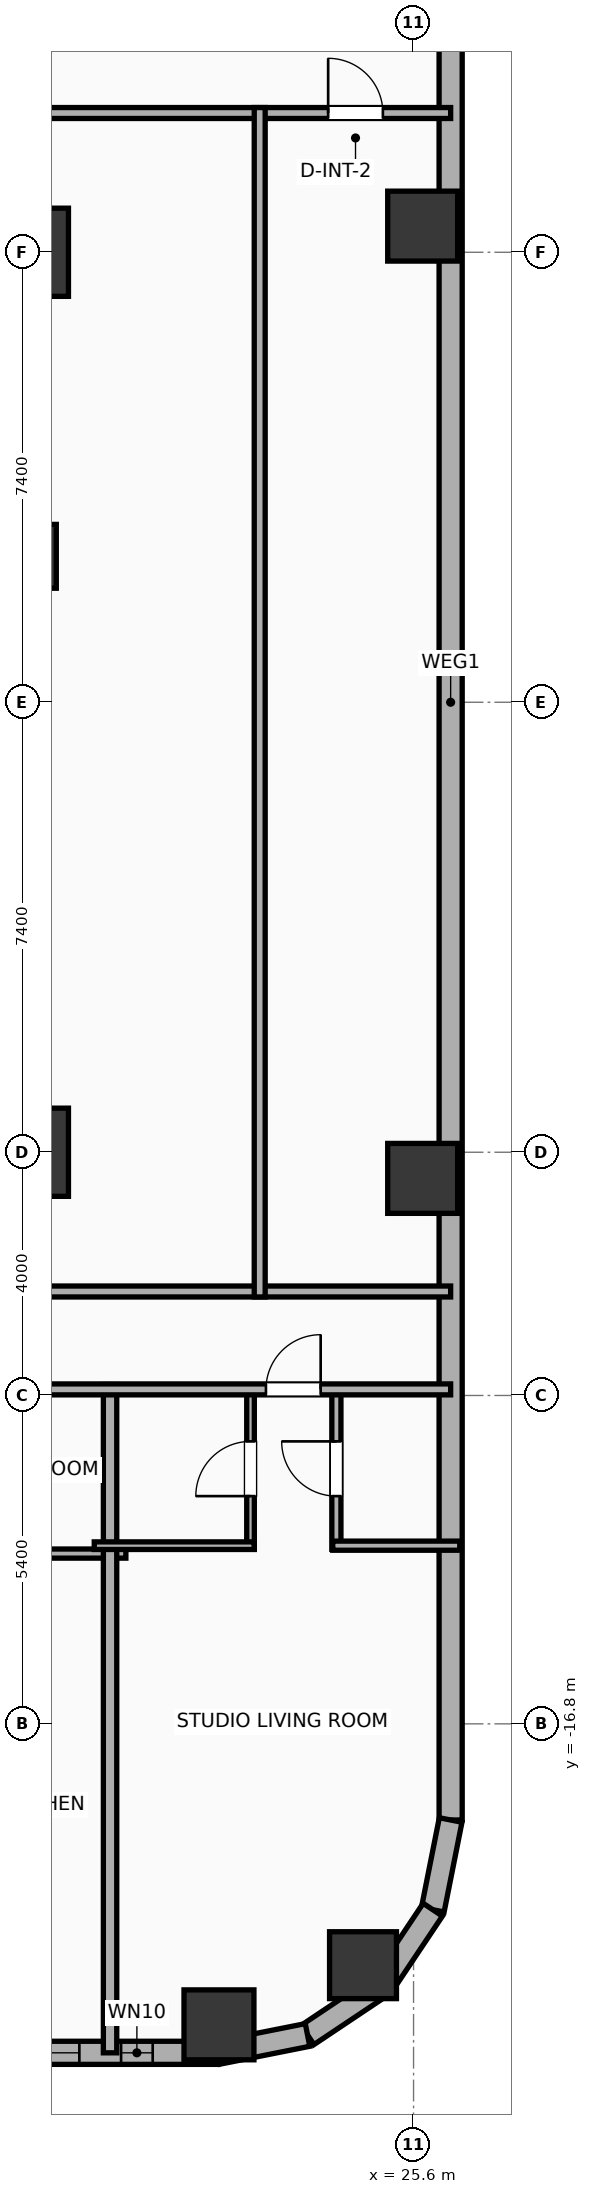
"""IFC4 building model, lengths in metres.
Left out: names, types, materials, properties, quantities, classifications, styles, units other than length and angle.
Written with IfcOpenShell. Run it as: python <this file> out.ifc"""

import sys

from ifc_helpers import new_model, si_unit, direction, frame, frame_2d, origin, origin_2d, place, context, subcontext, project, spatial, rectangle, hollow_rectangle, hollow_circle, extrude, element, fill, save


model = new_model("IFC4")
c1 = context("Model", 3, precision=1e-05, world=origin(), true_north=direction((0.0, 1.0)))
c2 = subcontext(c1, "Body", "Model", "MODEL_VIEW")
j1 = project(units=[si_unit("LENGTHUNIT", "METRE"), si_unit("PLANEANGLEUNIT", "RADIAN")], contexts=[c1])
p1 = place(None, origin())
s1 = spatial("IfcSite", under=j1, at=p1, CompositionType="ELEMENT")
p2 = place(p1, origin())
s2 = spatial("IfcBuilding", under=s1, at=p2, CompositionType="ELEMENT")
p3 = place(p2, frame((0.0, 0.0, 49.4)))
s3 = spatial("IfcBuildingStorey", under=s2, at=p3, CompositionType="ELEMENT", Elevation=49.4)
p4 = place(p3, frame((19.2, -7.4, 0.0), z_axis=(0.0, 0.0, 1.0), x_axis=(1.0, 0.0, 0.0)))
e1 = element("IfcColumn", 1, at=p4, inside=s3, PredefinedType="COLUMN", context=c2, shape_type="SweptSolid", body=[
    extrude(rectangle(XDim=1.45, YDim=1.45, at=origin_2d()), origin(), (0.0, 0.0, 1.0), 3.9),
])
p5 = place(p3, frame((19.2, 2.4, 0.0), z_axis=(0.0, 0.0, 1.0), x_axis=(1.0, 0.0, 0.0)))
e2 = element("IfcColumn", 2, at=p5, inside=s3, PredefinedType="COLUMN", context=c2, shape_type="SweptSolid", body=[
    extrude(rectangle(XDim=1.05, YDim=1.05, at=origin_2d()), origin(), (0.0, 0.0, 1.0), 3.9),
])
p6 = place(p3, frame((19.2, 7.4, 0.0), z_axis=(0.0, 0.0, 1.0), x_axis=(1.0, 0.0, 0.0)))
e3 = element("IfcColumn", 3, at=p6, inside=s3, PredefinedType="COLUMN", context=c2, shape_type="SweptSolid", body=[
    extrude(rectangle(XDim=1.45, YDim=1.45, at=origin_2d()), origin(), (0.0, 0.0, 1.0), 3.9),
])
p7 = place(p3, frame((22.4, -21.75, 0.0), z_axis=(0.0, 0.0, 1.0), x_axis=(1.0, 0.0, 0.0)))
e4 = element("IfcColumn", 4, at=p7, inside=s3, PredefinedType="COLUMN", context=c2, shape_type="SweptSolid", body=[
    extrude(hollow_rectangle(XDim=1.15, YDim=1.15, WallThickness=0.04, at=origin_2d()), origin(), (0.0, 0.0, 1.0), 3.9),
])
p8 = place(p3, frame((24.769, -20.769, 0.0), z_axis=(0.0, 0.0, 1.0), x_axis=(1.0, 0.0, 0.0)))
e5 = element("IfcColumn", 5, at=p8, inside=s3, PredefinedType="COLUMN", context=c2, shape_type="SweptSolid", body=[
    extrude(hollow_circle(Radius=0.55, WallThickness=0.036, at=origin_2d()), origin(), (0.0, 0.0, 1.0), 3.9),
])
for number, where, z_axis, x_axis in (
    (6, (25.75, -7.83, 0.0), (0.0, 0.0, 1.0), (1.0, 0.0, 0.0)),
    (7, (25.75, 7.83, 0.0), (0.0, 0.0, 1.0), (1.0, 0.0, 0.0)),
):
    element("IfcColumn", number, at=place(p3, frame(where, z_axis=z_axis, x_axis=x_axis)), inside=s3, PredefinedType="COLUMN", context=c2, shape_type="SweptSolid", body=[
        extrude(hollow_rectangle(XDim=1.15, YDim=1.15, WallThickness=0.04, at=origin_2d()), origin(), (0.0, 0.0, 1.0), 3.9),
    ])
p9 = place(p3, frame((22.381, -22.21, 0.0), z_axis=(0.0, 0.0, 1.0), x_axis=(-1.0, 0.0, 0.0)))
e8 = element("IfcWall", 8, at=p9, inside=s3, PredefinedType="ELEMENTEDWALL", context=c2, shape_type="SweptSolid", body=[
    extrude(rectangle(XDim=51.963, YDim=0.38, at=frame_2d((25.981, 0.0))), origin(), (0.0, 0.0, 1.0), 3.65),
])
p10 = place(p9, frame((49.952, 0.0, 0.75)))
e9 = element("IfcOpeningElement", 9, at=p10, cuts=e8, PredefinedType="OPENING", context=c2, shape_type="SweptSolid", body=[
    extrude(rectangle(XDim=1.2, YDim=2.05, at=frame_2d((0.6, 1.025))), frame((0.0, 0.2, 0.0), z_axis=(0.0, -1.0, 0.0), x_axis=(1.0, 0.0, 0.0)), (0.0, 0.0, 1.0), 0.4),
])
p11 = place(p9, frame((47.486, 0.0, 0.75)))
e10 = element("IfcOpeningElement", 10, at=p11, cuts=e8, PredefinedType="OPENING", context=c2, shape_type="SweptSolid", body=[
    extrude(rectangle(XDim=1.2, YDim=2.05, at=frame_2d((0.6, 1.025))), frame((0.0, 0.2, 0.0), z_axis=(0.0, -1.0, 0.0), x_axis=(1.0, 0.0, 0.0)), (0.0, 0.0, 1.0), 0.4),
])
p12 = place(p9, frame((42.361, 0.0, 0.75)))
e11 = element("IfcOpeningElement", 11, at=p12, cuts=e8, PredefinedType="OPENING", context=c2, shape_type="SweptSolid", body=[
    extrude(rectangle(XDim=0.85, YDim=2.05, at=frame_2d((0.425, 1.025))), frame((0.0, 0.2, 0.0), z_axis=(0.0, -1.0, 0.0), x_axis=(1.0, 0.0, 0.0)), (0.0, 0.0, 1.0), 0.4),
])
p13 = place(p9, frame((44.476, 0.0, 0.75)))
e12 = element("IfcOpeningElement", 12, at=p13, cuts=e8, PredefinedType="OPENING", context=c2, shape_type="SweptSolid", body=[
    extrude(rectangle(XDim=1.2, YDim=2.05, at=frame_2d((0.6, 1.025))), frame((0.0, 0.2, 0.0), z_axis=(0.0, -1.0, 0.0), x_axis=(1.0, 0.0, 0.0)), (0.0, 0.0, 1.0), 0.4),
])
p14 = place(p9, frame((34.811, 0.0, 0.75)))
e13 = element("IfcOpeningElement", 13, at=p14, cuts=e8, PredefinedType="OPENING", context=c2, shape_type="SweptSolid", body=[
    extrude(rectangle(XDim=1.2, YDim=2.05, at=frame_2d((0.6, 1.025))), frame((0.0, 0.2, 0.0), z_axis=(0.0, -1.0, 0.0), x_axis=(1.0, 0.0, 0.0)), (0.0, 0.0, 1.0), 0.4),
])
p15 = place(p9, frame((38.061, 0.0, 0.75)))
e14 = element("IfcOpeningElement", 14, at=p15, cuts=e8, PredefinedType="OPENING", context=c2, shape_type="SweptSolid", body=[
    extrude(rectangle(XDim=1.2, YDim=2.05, at=frame_2d((0.6, 1.025))), frame((0.0, 0.2, 0.0), z_axis=(0.0, -1.0, 0.0), x_axis=(1.0, 0.0, 0.0)), (0.0, 0.0, 1.0), 0.4),
])
p16 = place(p9, frame((29.171, 0.0, 0.75)))
e15 = element("IfcOpeningElement", 15, at=p16, cuts=e8, PredefinedType="OPENING", context=c2, shape_type="SweptSolid", body=[
    extrude(rectangle(XDim=1.2, YDim=2.05, at=frame_2d((0.6, 1.025))), frame((0.0, 0.2, 0.0), z_axis=(0.0, -1.0, 0.0), x_axis=(1.0, 0.0, 0.0)), (0.0, 0.0, 1.0), 0.4),
])
p17 = place(p9, frame((21.757, 0.0, 0.75)))
e16 = element("IfcOpeningElement", 16, at=p17, cuts=e8, PredefinedType="OPENING", context=c2, shape_type="SweptSolid", body=[
    extrude(rectangle(XDim=1.2, YDim=2.05, at=frame_2d((0.6, 1.025))), frame((0.0, 0.2, 0.0), z_axis=(0.0, -1.0, 0.0), x_axis=(1.0, 0.0, 0.0)), (0.0, 0.0, 1.0), 0.4),
])
p18 = place(p9, frame((25.007, 0.0, 0.75)))
e17 = element("IfcOpeningElement", 17, at=p18, cuts=e8, PredefinedType="OPENING", context=c2, shape_type="SweptSolid", body=[
    extrude(rectangle(XDim=1.2, YDim=2.05, at=frame_2d((0.6, 1.025))), frame((0.0, 0.2, 0.0), z_axis=(0.0, -1.0, 0.0), x_axis=(1.0, 0.0, 0.0)), (0.0, 0.0, 1.0), 0.4),
])
p19 = place(p9, frame((17.697, 0.0, 0.75)))
e18 = element("IfcOpeningElement", 18, at=p19, cuts=e8, PredefinedType="OPENING", context=c2, shape_type="SweptSolid", body=[
    extrude(rectangle(XDim=1.2, YDim=2.05, at=frame_2d((0.6, 1.025))), frame((0.0, 0.2, 0.0), z_axis=(0.0, -1.0, 0.0), x_axis=(1.0, 0.0, 0.0)), (0.0, 0.0, 1.0), 0.4),
])
p20 = place(p9, frame((14.447, 0.0, 0.75)))
e19 = element("IfcOpeningElement", 19, at=p20, cuts=e8, PredefinedType="OPENING", context=c2, shape_type="SweptSolid", body=[
    extrude(rectangle(XDim=1.2, YDim=2.05, at=frame_2d((0.6, 1.025))), frame((0.0, 0.2, 0.0), z_axis=(0.0, -1.0, 0.0), x_axis=(1.0, 0.0, 0.0)), (0.0, 0.0, 1.0), 0.4),
])
p21 = place(p9, frame((11.231, 0.0, 0.75)))
e20 = element("IfcOpeningElement", 20, at=p21, cuts=e8, PredefinedType="OPENING", context=c2, shape_type="SweptSolid", body=[
    extrude(rectangle(XDim=1.2, YDim=2.05, at=frame_2d((0.6, 1.025))), frame((0.0, 0.2, 0.0), z_axis=(0.0, -1.0, 0.0), x_axis=(1.0, 0.0, 0.0)), (0.0, 0.0, 1.0), 0.4),
])
p22 = place(p9, frame((5.082, 0.0, 0.75)))
e21 = element("IfcOpeningElement", 21, at=p22, cuts=e8, PredefinedType="OPENING", context=c2, shape_type="SweptSolid", body=[
    extrude(rectangle(XDim=1.2, YDim=2.05, at=frame_2d((0.6, 1.025))), frame((0.0, 0.2, 0.0), z_axis=(0.0, -1.0, 0.0), x_axis=(1.0, 0.0, 0.0)), (0.0, 0.0, 1.0), 0.4),
])
p23 = place(p9, frame((2.277, 0.0, 0.75)))
e22 = element("IfcOpeningElement", 22, at=p23, cuts=e8, PredefinedType="OPENING", context=c2, shape_type="SweptSolid", body=[
    extrude(rectangle(XDim=1.2, YDim=2.05, at=frame_2d((0.6, 1.025))), frame((0.0, 0.2, 0.0), z_axis=(0.0, -1.0, 0.0), x_axis=(1.0, 0.0, 0.0)), (0.0, 0.0, 1.0), 0.4),
])
p24 = place(p9, frame((1.071, 0.0, 0.75)))
e23 = element("IfcOpeningElement", 23, at=p24, cuts=e8, PredefinedType="OPENING", context=c2, shape_type="SweptSolid", body=[
    extrude(rectangle(XDim=0.52, YDim=2.05, at=frame_2d((0.26, 1.025))), frame((0.0, 0.2, 0.0), z_axis=(0.0, -1.0, 0.0), x_axis=(1.0, 0.0, 0.0)), (0.0, 0.0, 1.0), 0.4),
])
p25 = place(p3, frame((26.21, 18.381, 0.0), z_axis=(0.0, 0.0, 1.0), x_axis=(0.0, -1.0, 0.0)))
e24 = element("IfcWall", 24, at=p25, inside=s3, PredefinedType="ELEMENTEDWALL", context=c2, shape_type="SweptSolid", body=[
    extrude(rectangle(XDim=36.763, YDim=0.38, at=frame_2d((18.381, 0.0))), origin(), (0.0, 0.0, 1.0), 3.65),
])
p26 = place(p3, frame((26.21, -18.381, 0.0), z_axis=(0.0, 0.0, 1.0), x_axis=(-0.195086038585, -0.980786132421, 0.0)))
e25 = element("IfcWall", 25, at=p26, inside=s3, PredefinedType="ELEMENTEDWALL", context=c2, shape_type="SweptSolid", body=[
    extrude(rectangle(XDim=1.504, YDim=0.38, at=frame_2d((0.752, 0.0))), origin(), (0.0, 0.0, 1.0), 3.65),
])
for number, where, z_axis, x_axis in (
    (26, (25.917, -19.857, 0.0), (0.0, 0.0, 1.0), (-0.556, -0.831, 0.0)),
    (27, (25.091, -21.091, 0.0), (0.0, 0.0, 1.0), (-0.831, -0.556, 0.0)),
):
    element("IfcWall", number, at=place(p3, frame(where, z_axis=z_axis, x_axis=x_axis)), inside=s3, PredefinedType="ELEMENTEDWALL", context=c2, shape_type="SweptSolid", body=[
        extrude(rectangle(XDim=1.485, YDim=0.38, at=frame_2d((0.743, 0.0))), origin(), (0.0, 0.0, 1.0), 3.65),
    ])
p27 = place(p3, frame((23.857, -21.917, 0.0), z_axis=(0.0, 0.0, 1.0), x_axis=(-0.980786132421, -0.195086038585, 0.0)))
e28 = element("IfcWall", 28, at=p27, inside=s3, PredefinedType="ELEMENTEDWALL", context=c2, shape_type="SweptSolid", body=[
    extrude(rectangle(XDim=1.504, YDim=0.38, at=frame_2d((0.752, 0.0))), origin(), (0.0, 0.0, 1.0), 3.65),
])
p28 = place(p3, frame((9.88, 9.69, 0.0), z_axis=(0.0, 0.0, 1.0), x_axis=(1.0, 0.0, 0.0)))
e29 = element("IfcWall", 29, at=p28, inside=s3, PredefinedType="PARTITIONING", context=c2, shape_type="SweptSolid", body=[
    extrude(rectangle(XDim=16.33, YDim=0.18, at=frame_2d((8.165, 0.0))), origin(), (0.0, 0.0, 1.0), 3.65),
])
p29 = place(p28, frame((14.316, 0.0, 0.0)))
e30 = element("IfcOpeningElement", 30, at=p29, cuts=e29, PredefinedType="OPENING", context=c2, shape_type="SweptSolid", body=[
    extrude(rectangle(XDim=0.9, YDim=2.05, at=frame_2d((0.45, 1.025))), frame((0.0, 0.1, 0.0), z_axis=(0.0, -1.0, 0.0), x_axis=(1.0, 0.0, 0.0)), (0.0, 0.0, 1.0), 0.2),
])
p30 = place(p3, frame((9.88, -9.69, 0.0), z_axis=(0.0, 0.0, 1.0), x_axis=(1.0, 0.0, 0.0)))
e31 = element("IfcWall", 31, at=p30, inside=s3, PredefinedType="PARTITIONING", context=c2, shape_type="SweptSolid", body=[
    extrude(rectangle(XDim=16.33, YDim=0.18, at=frame_2d((8.165, 0.0))), origin(), (0.0, 0.0, 1.0), 3.65),
])
p31 = place(p3, frame((18.319, -14.0, 0.0), z_axis=(0.0, 0.0, 1.0), x_axis=(1.0, 0.0, 0.0)))
e32 = element("IfcWall", 32, at=p31, inside=s3, PredefinedType="PLUMBINGWALL", context=c2, shape_type="SweptSolid", body=[
    extrude(rectangle(XDim=2.55, YDim=0.15, at=frame_2d((1.275, 0.0))), origin(), (0.0, 0.0, 1.0), 3.65),
])
p32 = place(p3, frame((20.609, -22.21, 0.0), z_axis=(0.0, 0.0, 1.0), x_axis=(0.0, 1.0, 0.0)))
e33 = element("IfcWall", 33, at=p32, inside=s3, PredefinedType="PARTITIONING", context=c2, shape_type="SweptSolid", body=[
    extrude(rectangle(XDim=10.99, YDim=0.22, at=frame_2d((5.495, 0.0))), origin(), (0.0, 0.0, 1.0), 2.94),
])
p33 = place(p3, frame((22.919, -13.93, 0.0), z_axis=(0.0, 0.0, 1.0), x_axis=(0.0, 1.0, 0.0)))
e34 = element("IfcWall", 34, at=p33, inside=s3, PredefinedType="PARTITIONING", context=c2, shape_type="SweptSolid", body=[
    extrude(rectangle(XDim=2.65, YDim=0.125, at=frame_2d((1.325, 0.0))), origin(), (0.0, 0.0, 1.0), 3.65),
])
p34 = place(p33, frame((0.875, 0.0, 0.0)))
e35 = element("IfcOpeningElement", 35, at=p34, cuts=e34, PredefinedType="OPENING", context=c2, shape_type="SweptSolid", body=[
    extrude(rectangle(XDim=0.9, YDim=2.05, at=frame_2d((0.45, 1.025))), frame((0.0, 0.073, 0.0), z_axis=(0.0, -1.0, 0.0), x_axis=(1.0, 0.0, 0.0)), (0.0, 0.0, 1.0), 0.145),
])
p35 = place(p3, frame((24.331, -13.93, 0.0), z_axis=(0.0, 0.0, 1.0), x_axis=(0.0, 1.0, 0.0)))
e36 = element("IfcWall", 36, at=p35, inside=s3, PredefinedType="PLUMBINGWALL", context=c2, shape_type="SweptSolid", body=[
    extrude(rectangle(XDim=2.65, YDim=0.15, at=frame_2d((1.325, 0.0))), origin(), (0.0, 0.0, 1.0), 3.65),
])
p36 = place(p35, frame((0.875, 0.0, 0.0)))
e37 = element("IfcOpeningElement", 37, at=p36, cuts=e36, PredefinedType="OPENING", context=c2, shape_type="SweptSolid", body=[
    extrude(rectangle(XDim=0.9, YDim=2.05, at=frame_2d((0.45, 1.025))), frame((0.0, 0.085, 0.0), z_axis=(0.0, -1.0, 0.0), x_axis=(1.0, 0.0, 0.0)), (0.0, 0.0, 1.0), 0.17),
])
p37 = place(p3, frame((20.349, -13.87, 0.0), z_axis=(0.0, 0.0, 1.0), x_axis=(1.0, 0.0, 0.0)))
e38 = element("IfcWall", 38, at=p37, inside=s3, PredefinedType="PARTITIONING", context=c2, shape_type="SweptSolid", body=[
    extrude(rectangle(XDim=2.63, YDim=0.125, at=frame_2d((1.315, 0.0))), origin(), (0.0, 0.0, 1.0), 3.65),
])
p38 = place(p3, frame((24.271, -13.87, 0.0), z_axis=(0.0, 0.0, 1.0), x_axis=(1.0, 0.0, 0.0)))
e39 = element("IfcWall", 39, at=p38, inside=s3, PredefinedType="PLUMBINGWALL", context=c2, shape_type="SweptSolid", body=[
    extrude(rectangle(XDim=2.089, YDim=0.15, at=frame_2d((1.044, 0.0))), origin(), (0.0, 0.0, 1.0), 3.65),
])
p39 = place(p3, frame((-33.41, -11.3, 0.0), z_axis=(0.0, 0.0, 1.0), x_axis=(1.0, 0.0, 0.0)))
e40 = element("IfcWall", 40, at=p39, inside=s3, PredefinedType="PARTITIONING", context=c2, shape_type="SweptSolid", body=[
    extrude(rectangle(XDim=59.62, YDim=0.18, at=frame_2d((29.81, 0.0))), origin(), (0.0, 0.0, 1.0), 3.65),
])
p40 = place(p39, frame((4.344, 0.0, 0.0)))
e41 = element("IfcOpeningElement", 41, at=p40, cuts=e40, PredefinedType="OPENING", context=c2, shape_type="SweptSolid", body=[
    extrude(rectangle(XDim=1.15, YDim=2.05, at=frame_2d((0.575, 1.025))), frame((0.0, 0.1, 0.0), z_axis=(0.0, -1.0, 0.0), x_axis=(1.0, 0.0, 0.0)), (0.0, 0.0, 1.0), 0.2),
])
p41 = place(p39, frame((13.358, 0.0, 0.0)))
e42 = element("IfcOpeningElement", 42, at=p41, cuts=e40, PredefinedType="OPENING", context=c2, shape_type="SweptSolid", body=[
    extrude(rectangle(XDim=1.15, YDim=2.05, at=frame_2d((0.575, 1.025))), frame((0.0, 0.1, 0.0), z_axis=(0.0, -1.0, 0.0), x_axis=(1.0, 0.0, 0.0)), (0.0, 0.0, 1.0), 0.2),
])
p42 = place(p39, frame((19.773, 0.0, 0.0)))
e43 = element("IfcOpeningElement", 43, at=p42, cuts=e40, PredefinedType="OPENING", context=c2, shape_type="SweptSolid", body=[
    extrude(rectangle(XDim=1.15, YDim=2.05, at=frame_2d((0.575, 1.025))), frame((0.0, 0.1, 0.0), z_axis=(0.0, -1.0, 0.0), x_axis=(1.0, 0.0, 0.0)), (0.0, 0.0, 1.0), 0.2),
])
p43 = place(p39, frame((25.336, 0.0, 0.0)))
e44 = element("IfcOpeningElement", 44, at=p43, cuts=e40, PredefinedType="OPENING", context=c2, shape_type="SweptSolid", body=[
    extrude(rectangle(XDim=0.9, YDim=2.05, at=frame_2d((0.45, 1.025))), frame((0.0, 0.1, 0.0), z_axis=(0.0, -1.0, 0.0), x_axis=(1.0, 0.0, 0.0)), (0.0, 0.0, 1.0), 0.2),
])
p44 = place(p39, frame((32.83, 0.0, 0.0)))
e45 = element("IfcOpeningElement", 45, at=p44, cuts=e40, PredefinedType="OPENING", context=c2, shape_type="SweptSolid", body=[
    extrude(rectangle(XDim=1.15, YDim=2.05, at=frame_2d((0.575, 1.025))), frame((0.0, 0.1, 0.0), z_axis=(0.0, -1.0, 0.0), x_axis=(1.0, 0.0, 0.0)), (0.0, 0.0, 1.0), 0.2),
])
p45 = place(p39, frame((36.95, 0.0, 0.0)))
e46 = element("IfcOpeningElement", 46, at=p45, cuts=e40, PredefinedType="OPENING", context=c2, shape_type="SweptSolid", body=[
    extrude(rectangle(XDim=1.15, YDim=2.05, at=frame_2d((0.575, 1.025))), frame((0.0, 0.1, 0.0), z_axis=(0.0, -1.0, 0.0), x_axis=(1.0, 0.0, 0.0)), (0.0, 0.0, 1.0), 0.2),
])
p46 = place(p39, frame((44.837, 0.0, 0.0)))
e47 = element("IfcOpeningElement", 47, at=p46, cuts=e40, PredefinedType="OPENING", context=c2, shape_type="SweptSolid", body=[
    extrude(rectangle(XDim=0.9, YDim=2.05, at=frame_2d((0.45, 1.025))), frame((0.0, 0.1, 0.0), z_axis=(0.0, -1.0, 0.0), x_axis=(1.0, 0.0, 0.0)), (0.0, 0.0, 1.0), 0.2),
])
p47 = place(p39, frame((49.565, 0.0, 0.0)))
e48 = element("IfcOpeningElement", 48, at=p47, cuts=e40, PredefinedType="OPENING", context=c2, shape_type="SweptSolid", body=[
    extrude(rectangle(XDim=1.15, YDim=2.05, at=frame_2d((0.575, 1.025))), frame((0.0, 0.1, 0.0), z_axis=(0.0, -1.0, 0.0), x_axis=(1.0, 0.0, 0.0)), (0.0, 0.0, 1.0), 0.2),
])
p48 = place(p39, frame((56.583, 0.0, 0.0)))
e49 = element("IfcOpeningElement", 49, at=p48, cuts=e40, PredefinedType="OPENING", context=c2, shape_type="SweptSolid", body=[
    extrude(rectangle(XDim=0.9, YDim=2.05, at=frame_2d((0.45, 1.025))), frame((0.0, 0.1, 0.0), z_axis=(0.0, -1.0, 0.0), x_axis=(1.0, 0.0, 0.0)), (0.0, 0.0, 1.0), 0.2),
])
p49 = place(p3, frame((23.07, -9.78, 0.0), z_axis=(0.0, 0.0, 1.0), x_axis=(0.0, 1.0, 0.0)))
e50 = element("IfcWall", 50, at=p49, inside=s3, PredefinedType="PARTITIONING", context=c2, shape_type="SweptSolid", body=[
    extrude(rectangle(XDim=19.56, YDim=0.18, at=frame_2d((9.78, 0.0))), origin(), (0.0, 0.0, 1.0), 3.65),
])
p50 = place(p23, origin())
e51 = element("IfcWindow", 51, at=p50, inside=s3, PartitioningType="SINGLE_PANEL", PredefinedType="WINDOW", context=c2, shape_type="SweptSolid", body=[
    extrude(rectangle(XDim=1.2, YDim=2.05, at=frame_2d((0.6, 1.025))), frame((0.0, 0.03, 0.0), z_axis=(0.0, -1.0, 0.0), x_axis=(1.0, 0.0, 0.0)), (0.0, 0.0, 1.0), 0.06),
])
fill(e22, e51)
p51 = place(p24, origin())
e52 = element("IfcWindow", 52, at=p51, inside=s3, PartitioningType="SINGLE_PANEL", PredefinedType="WINDOW", context=c2, shape_type="SweptSolid", body=[
    extrude(rectangle(XDim=0.52, YDim=2.05, at=frame_2d((0.26, 1.025))), frame((0.0, 0.03, 0.0), z_axis=(0.0, -1.0, 0.0), x_axis=(1.0, 0.0, 0.0)), (0.0, 0.0, 1.0), 0.06),
])
fill(e23, e52)
p52 = place(p29, origin())
e53 = element("IfcDoor", 53, at=p52, inside=s3, OperationType="SINGLE_SWING_LEFT", PredefinedType="DOOR", context=c2, shape_type="SweptSolid", body=[
    extrude(rectangle(XDim=0.9, YDim=2.05, at=frame_2d((0.45, 1.025))), frame((0.0, 0.025, 0.0), z_axis=(0.0, -1.0, 0.0), x_axis=(1.0, 0.0, 0.0)), (0.0, 0.0, 1.0), 0.05),
])
fill(e30, e53)
p53 = place(p34, origin())
e54 = element("IfcDoor", 54, at=p53, inside=s3, OperationType="SINGLE_SWING_LEFT", PredefinedType="DOOR", context=c2, shape_type="SweptSolid", body=[
    extrude(rectangle(XDim=0.9, YDim=2.05, at=frame_2d((0.45, 1.025))), frame((0.0, 0.025, 0.0), z_axis=(0.0, -1.0, 0.0), x_axis=(1.0, 0.0, 0.0)), (0.0, 0.0, 1.0), 0.05),
])
fill(e35, e54)
p54 = place(p36, origin())
e55 = element("IfcDoor", 55, at=p54, inside=s3, OperationType="SINGLE_SWING_RIGHT", PredefinedType="DOOR", context=c2, shape_type="SweptSolid", body=[
    extrude(rectangle(XDim=0.9, YDim=2.05, at=frame_2d((0.45, 1.025))), frame((0.0, 0.025, 0.0), z_axis=(0.0, -1.0, 0.0), x_axis=(1.0, 0.0, 0.0)), (0.0, 0.0, 1.0), 0.05),
])
fill(e37, e55)
p55 = place(p48, origin())
e56 = element("IfcDoor", 56, at=p55, inside=s3, OperationType="SINGLE_SWING_RIGHT", PredefinedType="DOOR", context=c2, shape_type="SweptSolid", body=[
    extrude(rectangle(XDim=0.9, YDim=2.05, at=frame_2d((0.45, 1.025))), frame((0.0, 0.025, 0.0), z_axis=(0.0, -1.0, 0.0), x_axis=(1.0, 0.0, 0.0)), (0.0, 0.0, 1.0), 0.05),
])
fill(e49, e56)
save(model, sys.argv[1])
